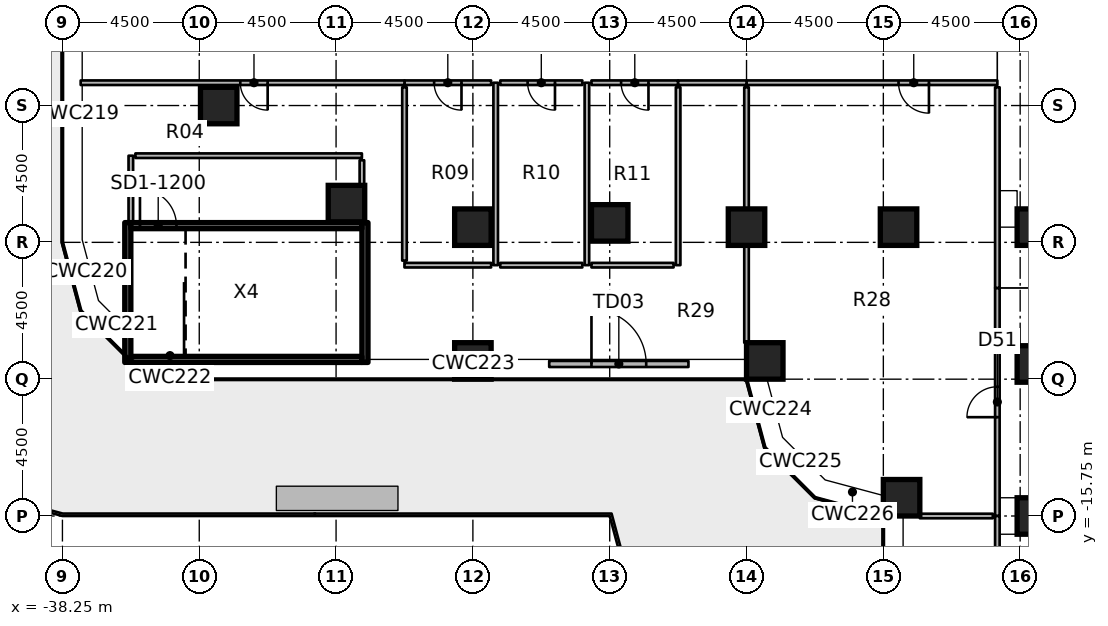
"""IFC4 building model, lengths in metres.
Left out: names, types, materials, properties, quantities, classifications, styles, units other than length and angle.
Written with IfcOpenShell. Run it as: python <this file> out.ifc"""

import sys

from ifc_helpers import new_model, si_unit, direction, frame, frame_2d, origin, origin_2d, place, context, subcontext, project, spatial, rectangle, extrude, element, fill, save


model = new_model("IFC4")
c1 = context("Model", 3, precision=1e-05, world=origin(), true_north=direction((0.0, 1.0)))
c2 = subcontext(c1, "Body", "Model", "MODEL_VIEW")
j1 = project(units=[si_unit("LENGTHUNIT", "METRE"), si_unit("PLANEANGLEUNIT", "RADIAN")], contexts=[c1])
p1 = place(None, origin())
s1 = spatial("IfcSite", under=j1, at=p1, CompositionType="ELEMENT")
p2 = place(p1, origin())
s2 = spatial("IfcBuilding", under=s1, at=p2, CompositionType="ELEMENT")
p3 = place(p2, frame((0.0, 0.0, 22.0)))
s3 = spatial("IfcBuildingStorey", under=s2, at=p3, CompositionType="ELEMENT", Elevation=22.0)
for number, where, z_axis, x_axis in (
    (1, (-33.11, -2.25, 0.0), (0.0, 0.0, 1.0), (1.0, 0.0, 0.0)),
    (2, (-28.908, -5.475, 0.0), (0.0, 0.0, 1.0), (1.0, 0.0, 0.0)),
):
    element("IfcColumn", number, at=place(p3, frame(where, z_axis=z_axis, x_axis=x_axis)), inside=s3, PredefinedType="COLUMN", context=c2, shape_type="SweptSolid", body=[
        extrude(rectangle(XDim=1.2, YDim=1.2, at=origin_2d()), origin(), (0.0, 0.0, 1.0), 4.85),
    ])
p4 = place(p3, frame((-24.75, -10.65, 0.0), z_axis=(0.0, 0.0, 1.0), x_axis=(1.0, 0.0, 0.0)))
e3 = element("IfcColumn", 3, at=p4, inside=s3, PredefinedType="COLUMN", context=c2, shape_type="SweptSolid", body=[
    extrude(rectangle(XDim=1.2, YDim=1.2, at=origin_2d()), origin(), (0.0, 0.0, 1.0), 4.55),
])
for number, where, z_axis, x_axis in (
    (4, (-24.75, -6.25, 0.0), (0.0, 0.0, 1.0), (1.0, 0.0, 0.0)),
    (5, (-20.25, -6.11, 0.0), (0.0, 0.0, 1.0), (1.0, 0.0, 0.0)),
):
    element("IfcColumn", number, at=place(p3, frame(where, z_axis=z_axis, x_axis=x_axis)), inside=s3, PredefinedType="COLUMN", context=c2, shape_type="SweptSolid", body=[
        extrude(rectangle(XDim=1.2, YDim=1.2, at=origin_2d()), origin(), (0.0, 0.0, 1.0), 4.85),
    ])
p5 = place(p3, frame((-15.15, -10.65, 0.0), z_axis=(0.0, 0.0, 1.0), x_axis=(1.0, 0.0, 0.0)))
e6 = element("IfcColumn", 6, at=p5, inside=s3, PredefinedType="COLUMN", context=c2, shape_type="SweptSolid", body=[
    extrude(rectangle(XDim=1.2, YDim=1.2, at=origin_2d()), origin(), (0.0, 0.0, 1.0), 4.55),
])
p6 = place(p3, frame((-15.75, -6.25, 0.0), z_axis=(0.0, 0.0, 1.0), x_axis=(1.0, 0.0, 0.0)))
e7 = element("IfcColumn", 7, at=p6, inside=s3, PredefinedType="COLUMN", context=c2, shape_type="SweptSolid", body=[
    extrude(rectangle(XDim=1.2, YDim=1.2, at=origin_2d()), origin(), (0.0, 0.0, 1.0), 4.85),
])
p7 = place(p3, frame((-10.65, -15.15, 0.0), z_axis=(0.0, 0.0, 1.0), x_axis=(1.0, 0.0, 0.0)))
e8 = element("IfcColumn", 8, at=p7, inside=s3, PredefinedType="COLUMN", context=c2, shape_type="SweptSolid", body=[
    extrude(rectangle(XDim=1.2, YDim=1.2, at=origin_2d()), origin(), (0.0, 0.0, 1.0), 4.55),
])
for number, where, z_axis, x_axis in (
    (9, (-10.75, -6.25, 0.0), (0.0, 0.0, 1.0), (1.0, 0.0, 0.0)),
    (10, (-6.25, -15.75, 0.0), (0.0, 0.0, 1.0), (1.0, 0.0, 0.0)),
    (11, (-6.25, -10.75, 0.0), (0.0, 0.0, 1.0), (1.0, 0.0, 0.0)),
    (12, (-6.25, -6.25, 0.0), (0.0, 0.0, 1.0), (1.0, 0.0, 0.0)),
):
    element("IfcColumn", number, at=place(p3, frame(where, z_axis=z_axis, x_axis=x_axis)), inside=s3, PredefinedType="COLUMN", context=c2, shape_type="SweptSolid", body=[
        extrude(rectangle(XDim=1.2, YDim=1.2, at=origin_2d()), origin(), (0.0, 0.0, 1.0), 4.85),
    ])
p8 = place(p3, frame((-22.24, -10.75, 0.0), z_axis=(0.0, 0.0, 1.0), x_axis=(1.0, 0.0, 0.0)))
e13 = element("IfcWall", 13, at=p8, inside=s3, PredefinedType="SOLIDWALL", context=c2, shape_type="SweptSolid", body=[
    extrude(rectangle(XDim=4.58, YDim=0.2, at=frame_2d((2.29, 0.0))), origin(), (0.0, 0.0, 1.0), 3.95),
])
p9 = place(p8, frame((1.39, 0.0, 0.0)))
e14 = element("IfcOpeningElement", 14, at=p9, cuts=e13, PredefinedType="OPENING", context=c2, shape_type="SweptSolid", body=[
    extrude(rectangle(XDim=1.8, YDim=2.4, at=frame_2d((0.9, 1.2))), frame((0.0, 0.11, 0.0), z_axis=(0.0, -1.0, 0.0), x_axis=(1.0, 0.0, 0.0)), (0.0, 0.0, 1.0), 0.22),
])
for number, where, z_axis, x_axis in (
    (15, (-36.1, -10.7, 0.0), (0.0, 0.0, 1.0), (0.0, 1.0, 0.0)),
    (16, (-28.3, -10.7, 0.0), (0.0, 0.0, 1.0), (0.0, 1.0, 0.0)),
):
    element("IfcWall", number, at=place(p3, frame(where, z_axis=z_axis, x_axis=x_axis)), inside=s3, PredefinedType="SHEAR", context=c2, shape_type="SweptSolid", body=[
        extrude(rectangle(XDim=4.6, YDim=0.2, at=frame_2d((2.3, 0.0))), origin(), (0.0, 0.0, 1.0), 4.55),
    ])
p10 = place(p3, frame((-36.0, -10.6, 0.0), z_axis=(0.0, 0.0, 1.0), x_axis=(1.0, 0.0, 0.0)))
e17 = element("IfcWall", 17, at=p10, inside=s3, PredefinedType="SHEAR", context=c2, shape_type="SweptSolid", body=[
    extrude(rectangle(XDim=7.6, YDim=0.2, at=frame_2d((3.8, 0.0))), origin(), (0.0, 0.0, 1.0), 4.55),
])
p11 = place(p3, frame((-36.0, -6.2, 0.0), z_axis=(0.0, 0.0, 1.0), x_axis=(1.0, 0.0, 0.0)))
e18 = element("IfcWall", 18, at=p11, inside=s3, PredefinedType="SHEAR", context=c2, shape_type="SweptSolid", body=[
    extrude(rectangle(XDim=7.6, YDim=0.2, at=frame_2d((3.8, 0.0))), origin(), (0.0, 0.0, 1.0), 4.55),
])
p12 = place(p11, frame((0.3, 0.0, 0.0)))
e19 = element("IfcOpeningElement", 19, at=p12, cuts=e18, PredefinedType="OPENING", context=c2, shape_type="SweptSolid", body=[
    extrude(rectangle(XDim=1.2, YDim=2.1, at=frame_2d((0.6, 1.05))), frame((0.0, 0.11, 0.0), z_axis=(0.0, -1.0, 0.0), x_axis=(1.0, 0.0, 0.0)), (0.0, 0.0, 1.0), 0.22),
])
p13 = place(p3, frame((-36.0, -6.1, 0.0), z_axis=(0.0, 0.0, 1.0), x_axis=(0.0, 1.0, 0.0)))
e20 = element("IfcWall", 20, at=p13, inside=s3, PredefinedType="PARTITIONING", context=c2, shape_type="SweptSolid", body=[
    extrude(rectangle(XDim=2.2, YDim=0.15, at=frame_2d((1.1, 0.0))), origin(), (0.0, 0.0, 1.0), 4.55),
])
p14 = place(p3, frame((-35.85, -3.9, 0.0), z_axis=(0.0, 0.0, 1.0), x_axis=(1.0, 0.0, 0.0)))
e21 = element("IfcWall", 21, at=p14, inside=s3, PredefinedType="PARTITIONING", context=c2, shape_type="SweptSolid", body=[
    extrude(rectangle(XDim=7.45, YDim=0.15, at=frame_2d((3.725, 0.0))), origin(), (0.0, 0.0, 1.0), 3.93),
])
p15 = place(p3, frame((-28.4, -4.05, 0.0), z_axis=(0.0, 0.0, 1.0), x_axis=(0.0, -1.0, 0.0)))
e22 = element("IfcWall", 22, at=p15, inside=s3, PredefinedType="PARTITIONING", context=c2, shape_type="SweptSolid", body=[
    extrude(rectangle(XDim=0.825, YDim=0.15, at=frame_2d((0.413, 0.0))), origin(), (0.0, 0.0, 1.0), 4.55),
])
p16 = place(p3, frame((-24.0, -1.5, 0.0), z_axis=(0.0, 0.0, 1.0), x_axis=(0.0, -1.0, 0.0)))
e23 = element("IfcWall", 23, at=p16, inside=s3, PredefinedType="PARTITIONING", context=c2, shape_type="SweptSolid", body=[
    extrude(rectangle(XDim=6.0, YDim=0.15, at=frame_2d((3.0, 0.0))), origin(), (0.0, 0.0, 1.0), 3.93),
])
p17 = place(p3, frame((-24.15, -1.5, 0.0), z_axis=(0.0, 0.0, 1.0), x_axis=(-1.0, 0.0, 0.0)))
e24 = element("IfcWall", 24, at=p17, inside=s3, PredefinedType="PARTITIONING", context=c2, shape_type="SweptSolid", body=[
    extrude(rectangle(XDim=2.85, YDim=0.15, at=frame_2d((1.425, 0.0))), origin(), (0.0, 0.0, 1.0), 4.063),
])
p18 = place(p17, frame((0.975, 0.0, 0.0)))
e25 = element("IfcOpeningElement", 25, at=p18, cuts=e24, PredefinedType="OPENING", context=c2, shape_type="SweptSolid", body=[
    extrude(rectangle(XDim=0.9, YDim=2.1, at=frame_2d((0.45, 1.05))), frame((0.0, 0.085, 0.0), z_axis=(0.0, -1.0, 0.0), x_axis=(1.0, 0.0, 0.0)), (0.0, 0.0, 1.0), 0.17),
])
p19 = place(p3, frame((-24.15, -7.5, 0.0), z_axis=(0.0, 0.0, 1.0), x_axis=(-1.0, 0.0, 0.0)))
e26 = element("IfcWall", 26, at=p19, inside=s3, PredefinedType="PARTITIONING", context=c2, shape_type="SweptSolid", body=[
    extrude(rectangle(XDim=2.85, YDim=0.15, at=frame_2d((1.425, 0.0))), origin(), (0.0, 0.0, 1.0), 4.55),
])
p20 = place(p3, frame((-27.0, -7.35, 0.0), z_axis=(0.0, 0.0, 1.0), x_axis=(0.0, 1.0, 0.0)))
e27 = element("IfcWall", 27, at=p20, inside=s3, PredefinedType="PARTITIONING", context=c2, shape_type="SweptSolid", body=[
    extrude(rectangle(XDim=5.7, YDim=0.15, at=frame_2d((2.85, 0.0))), origin(), (0.0, 0.0, 1.0), 3.93),
])
p21 = place(p3, frame((-21.0, -1.5, 0.0), z_axis=(0.0, 0.0, 1.0), x_axis=(0.0, -1.0, 0.0)))
e28 = element("IfcWall", 28, at=p21, inside=s3, PredefinedType="PARTITIONING", context=c2, shape_type="SweptSolid", body=[
    extrude(rectangle(XDim=6.0, YDim=0.15, at=frame_2d((3.0, 0.0))), origin(), (0.0, 0.0, 1.0), 3.93),
])
p22 = place(p3, frame((-21.15, -1.5, 0.0), z_axis=(0.0, 0.0, 1.0), x_axis=(-1.0, 0.0, 0.0)))
e29 = element("IfcWall", 29, at=p22, inside=s3, PredefinedType="PARTITIONING", context=c2, shape_type="SweptSolid", body=[
    extrude(rectangle(XDim=2.7, YDim=0.15, at=frame_2d((1.35, 0.0))), origin(), (0.0, 0.0, 1.0), 4.55),
])
p23 = place(p22, frame((0.9, 0.0, 0.0)))
e30 = element("IfcOpeningElement", 30, at=p23, cuts=e29, PredefinedType="OPENING", context=c2, shape_type="SweptSolid", body=[
    extrude(rectangle(XDim=0.9, YDim=2.1, at=frame_2d((0.45, 1.05))), frame((0.0, 0.085, 0.0), z_axis=(0.0, -1.0, 0.0), x_axis=(1.0, 0.0, 0.0)), (0.0, 0.0, 1.0), 0.17),
])
p24 = place(p3, frame((-21.15, -7.5, 0.0), z_axis=(0.0, 0.0, 1.0), x_axis=(-1.0, 0.0, 0.0)))
e31 = element("IfcWall", 31, at=p24, inside=s3, PredefinedType="PARTITIONING", context=c2, shape_type="SweptSolid", body=[
    extrude(rectangle(XDim=2.7, YDim=0.15, at=frame_2d((1.35, 0.0))), origin(), (0.0, 0.0, 1.0), 4.55),
])
p25 = place(p3, frame((-18.0, -1.5, 0.0), z_axis=(0.0, 0.0, 1.0), x_axis=(-1.0, 0.0, 0.0)))
e32 = element("IfcWall", 32, at=p25, inside=s3, PredefinedType="PARTITIONING", context=c2, shape_type="SweptSolid", body=[
    extrude(rectangle(XDim=2.85, YDim=0.15, at=frame_2d((1.425, 0.0))), origin(), (0.0, 0.0, 1.0), 4.063),
])
p26 = place(p25, frame((0.975, 0.0, 0.0)))
e33 = element("IfcOpeningElement", 33, at=p26, cuts=e32, PredefinedType="OPENING", context=c2, shape_type="SweptSolid", body=[
    extrude(rectangle(XDim=0.9, YDim=2.1, at=frame_2d((0.45, 1.05))), frame((0.0, 0.085, 0.0), z_axis=(0.0, -1.0, 0.0), x_axis=(1.0, 0.0, 0.0)), (0.0, 0.0, 1.0), 0.17),
])
p27 = place(p3, frame((-18.0, -1.65, 0.0), z_axis=(0.0, 0.0, 1.0), x_axis=(0.0, -1.0, 0.0)))
e34 = element("IfcWall", 34, at=p27, inside=s3, PredefinedType="PARTITIONING", context=c2, shape_type="SweptSolid", body=[
    extrude(rectangle(XDim=5.85, YDim=0.15, at=frame_2d((2.925, 0.0))), origin(), (0.0, 0.0, 1.0), 3.93),
])
p28 = place(p3, frame((-18.15, -7.5, 0.0), z_axis=(0.0, 0.0, 1.0), x_axis=(-1.0, 0.0, 0.0)))
e35 = element("IfcWall", 35, at=p28, inside=s3, PredefinedType="PARTITIONING", context=c2, shape_type="SweptSolid", body=[
    extrude(rectangle(XDim=2.7, YDim=0.15, at=frame_2d((1.35, 0.0))), origin(), (0.0, 0.0, 1.0), 4.55),
])
p29 = place(p3, frame((-7.5, -15.75, 0.0), z_axis=(0.0, 0.0, 1.0), x_axis=(0.0, 1.0, 0.0)))
e36 = element("IfcWall", 36, at=p29, inside=s3, PredefinedType="PARTITIONING", context=c2, shape_type="SweptSolid", body=[
    extrude(rectangle(XDim=7.5, YDim=0.15, at=frame_2d((3.75, 0.0))), origin(), (0.0, 0.0, 1.0), 3.93),
])
p30 = place(p29, frame((3.25, 0.0, 0.0)))
e37 = element("IfcOpeningElement", 37, at=p30, cuts=e36, PredefinedType="OPENING", context=c2, shape_type="SweptSolid", body=[
    extrude(rectangle(XDim=1.0, YDim=2.1, at=frame_2d((0.5, 1.05))), frame((0.0, 0.085, 0.0), z_axis=(0.0, -1.0, 0.0), x_axis=(1.0, 0.0, 0.0)), (0.0, 0.0, 1.0), 0.17),
])
p31 = place(p3, frame((-7.5, -32.25, 0.0), z_axis=(0.0, 0.0, 1.0), x_axis=(0.0, 1.0, 0.0)))
e38 = element("IfcWall", 38, at=p31, inside=s3, PredefinedType="PARTITIONING", context=c2, shape_type="SweptSolid", body=[
    extrude(rectangle(XDim=16.5, YDim=0.15, at=frame_2d((8.25, 0.0))), origin(), (0.0, 0.0, 1.0), 4.55),
])
p32 = place(p31, frame((8.25, 0.0, 0.0)))
e39 = element("IfcOpeningElement", 39, at=p32, cuts=e38, PredefinedType="OPENING", context=c2, shape_type="SweptSolid", body=[
    extrude(rectangle(XDim=0.9, YDim=2.1, at=frame_2d((0.45, 1.05))), frame((0.0, 0.085, 0.0), z_axis=(0.0, -1.0, 0.0), x_axis=(1.0, 0.0, 0.0)), (0.0, 0.0, 1.0), 0.17),
])
p33 = place(p3, frame((-7.5, -1.5, 0.0), z_axis=(0.0, 0.0, 1.0), x_axis=(-1.0, 0.0, 0.0)))
e40 = element("IfcWall", 40, at=p33, inside=s3, PredefinedType="PARTITIONING", context=c2, shape_type="SweptSolid", body=[
    extrude(rectangle(XDim=8.25, YDim=0.15, at=frame_2d((4.125, 0.0))), origin(), (0.0, 0.0, 1.0), 4.063),
])
p34 = place(p33, frame((2.25, 0.0, 0.0)))
e41 = element("IfcOpeningElement", 41, at=p34, cuts=e40, PredefinedType="OPENING", context=c2, shape_type="SweptSolid", body=[
    extrude(rectangle(XDim=1.0, YDim=2.1, at=frame_2d((0.5, 1.05))), frame((0.0, 0.085, 0.0), z_axis=(0.0, -1.0, 0.0), x_axis=(1.0, 0.0, 0.0)), (0.0, 0.0, 1.0), 0.17),
])
p35 = place(p3, frame((-27.0, -1.5, 0.0), z_axis=(0.0, 0.0, 1.0), x_axis=(-1.0, 0.0, 0.0)))
e42 = element("IfcWall", 42, at=p35, inside=s3, PredefinedType="PARTITIONING", context=c2, shape_type="SweptSolid", body=[
    extrude(rectangle(XDim=10.65, YDim=0.15, at=frame_2d((5.325, 0.0))), origin(), (0.0, 0.0, 1.0), 3.93),
])
p36 = place(p35, frame((4.5, 0.0, 0.0)))
e43 = element("IfcOpeningElement", 43, at=p36, cuts=e42, PredefinedType="OPENING", context=c2, shape_type="SweptSolid", body=[
    extrude(rectangle(XDim=0.9, YDim=2.1, at=frame_2d((0.45, 1.05))), frame((0.0, 0.085, 0.0), z_axis=(0.0, -1.0, 0.0), x_axis=(1.0, 0.0, 0.0)), (0.0, 0.0, 1.0), 0.17),
])
p37 = place(p3, frame((-15.75, -1.5, 0.0), z_axis=(0.0, 0.0, 1.0), x_axis=(-1.0, 0.0, 0.0)))
e44 = element("IfcWall", 44, at=p37, inside=s3, PredefinedType="PARTITIONING", context=c2, shape_type="SweptSolid", body=[
    extrude(rectangle(XDim=2.25, YDim=0.15, at=frame_2d((1.125, 0.0))), origin(), (0.0, 0.0, 1.0), 4.063),
])
p38 = place(p3, frame((-15.75, -10.05, 0.0), z_axis=(0.0, 0.0, 1.0), x_axis=(0.0, 1.0, 0.0)))
e45 = element("IfcWall", 45, at=p38, inside=s3, PredefinedType="PARTITIONING", context=c2, shape_type="SweptSolid", body=[
    extrude(rectangle(XDim=3.2, YDim=0.15, at=frame_2d((1.6, 0.0))), origin(), (0.0, 0.0, 1.0), 4.55),
])
p39 = place(p3, frame((-15.75, -5.65, 0.0), z_axis=(0.0, 0.0, 1.0), x_axis=(0.0, 1.0, 0.0)))
e46 = element("IfcWall", 46, at=p39, inside=s3, PredefinedType="PARTITIONING", context=c2, shape_type="SweptSolid", body=[
    extrude(rectangle(XDim=4.0, YDim=0.15, at=frame_2d((2.0, 0.0))), origin(), (0.0, 0.0, 1.0), 4.063),
])
p40 = place(p3, frame((-7.65, -15.75, 0.0), z_axis=(0.0, 0.0, 1.0), x_axis=(-1.0, 0.0, 0.0)))
e47 = element("IfcWall", 47, at=p40, inside=s3, PredefinedType="PARTITIONING", context=c2, shape_type="SweptSolid", body=[
    extrude(rectangle(XDim=2.4, YDim=0.15, at=frame_2d((1.2, 0.0))), origin(), (0.0, 0.0, 1.0), 4.55),
])
p41 = place(p3, frame((-7.5, -1.65, 0.0), z_axis=(0.0, 0.0, 1.0), x_axis=(0.0, -1.0, 0.0)))
e48 = element("IfcWall", 48, at=p41, inside=s3, PredefinedType="PARTITIONING", context=c2, shape_type="SweptSolid", body=[
    extrude(rectangle(XDim=6.6, YDim=0.15, at=frame_2d((3.3, 0.0))), origin(), (0.0, 0.0, 1.0), 3.911),
])
p42 = place(p9, origin())
e49 = element("IfcDoor", 49, at=p42, inside=s3, OperationType="SINGLE_SWING_LEFT", PredefinedType="DOOR", context=c2, shape_type="SweptSolid", body=[
    extrude(rectangle(XDim=1.8, YDim=2.4, at=frame_2d((0.9, 1.2))), frame((0.0, 0.025, 0.0), z_axis=(0.0, -1.0, 0.0), x_axis=(1.0, 0.0, 0.0)), (0.0, 0.0, 1.0), 0.05),
])
fill(e14, e49)
p43 = place(p12, origin())
e50 = element("IfcDoor", 50, at=p43, inside=s3, OperationType="SINGLE_SWING_RIGHT", PredefinedType="DOOR", context=c2, shape_type="SweptSolid", body=[
    extrude(rectangle(XDim=1.2, YDim=2.1, at=frame_2d((0.6, 1.05))), frame((0.0, 0.025, 0.0), z_axis=(0.0, -1.0, 0.0), x_axis=(1.0, 0.0, 0.0)), (0.0, 0.0, 1.0), 0.05),
])
fill(e19, e50)
p44 = place(p18, origin())
e51 = element("IfcDoor", 51, at=p44, inside=s3, OperationType="SINGLE_SWING_LEFT", PredefinedType="DOOR", context=c2, shape_type="SweptSolid", body=[
    extrude(rectangle(XDim=0.9, YDim=2.1, at=frame_2d((0.45, 1.05))), frame((0.0, 0.025, 0.0), z_axis=(0.0, -1.0, 0.0), x_axis=(1.0, 0.0, 0.0)), (0.0, 0.0, 1.0), 0.05),
])
fill(e25, e51)
p45 = place(p23, origin())
e52 = element("IfcDoor", 52, at=p45, inside=s3, OperationType="SINGLE_SWING_LEFT", PredefinedType="DOOR", context=c2, shape_type="SweptSolid", body=[
    extrude(rectangle(XDim=0.9, YDim=2.1, at=frame_2d((0.45, 1.05))), frame((0.0, 0.025, 0.0), z_axis=(0.0, -1.0, 0.0), x_axis=(1.0, 0.0, 0.0)), (0.0, 0.0, 1.0), 0.05),
])
fill(e30, e52)
p46 = place(p26, origin())
e53 = element("IfcDoor", 53, at=p46, inside=s3, OperationType="SINGLE_SWING_LEFT", PredefinedType="DOOR", context=c2, shape_type="SweptSolid", body=[
    extrude(rectangle(XDim=0.9, YDim=2.1, at=frame_2d((0.45, 1.05))), frame((0.0, 0.025, 0.0), z_axis=(0.0, -1.0, 0.0), x_axis=(1.0, 0.0, 0.0)), (0.0, 0.0, 1.0), 0.05),
])
fill(e33, e53)
p47 = place(p30, origin())
e54 = element("IfcDoor", 54, at=p47, inside=s3, OperationType="SINGLE_SWING_LEFT", PredefinedType="DOOR", context=c2, shape_type="SweptSolid", body=[
    extrude(rectangle(XDim=1.0, YDim=2.1, at=frame_2d((0.5, 1.05))), frame((0.0, 0.025, 0.0), z_axis=(0.0, -1.0, 0.0), x_axis=(1.0, 0.0, 0.0)), (0.0, 0.0, 1.0), 0.05),
])
fill(e37, e54)
p48 = place(p34, origin())
e55 = element("IfcDoor", 55, at=p48, inside=s3, OperationType="SINGLE_SWING_LEFT", PredefinedType="DOOR", context=c2, shape_type="SweptSolid", body=[
    extrude(rectangle(XDim=1.0, YDim=2.1, at=frame_2d((0.5, 1.05))), frame((0.0, 0.025, 0.0), z_axis=(0.0, -1.0, 0.0), x_axis=(1.0, 0.0, 0.0)), (0.0, 0.0, 1.0), 0.05),
])
fill(e41, e55)
p49 = place(p36, origin())
e56 = element("IfcDoor", 56, at=p49, inside=s3, OperationType="SINGLE_SWING_LEFT", PredefinedType="DOOR", context=c2, shape_type="SweptSolid", body=[
    extrude(rectangle(XDim=0.9, YDim=2.1, at=frame_2d((0.45, 1.05))), frame((0.0, 0.025, 0.0), z_axis=(0.0, -1.0, 0.0), x_axis=(1.0, 0.0, 0.0)), (0.0, 0.0, 1.0), 0.05),
])
fill(e43, e56)
save(model, sys.argv[1])
